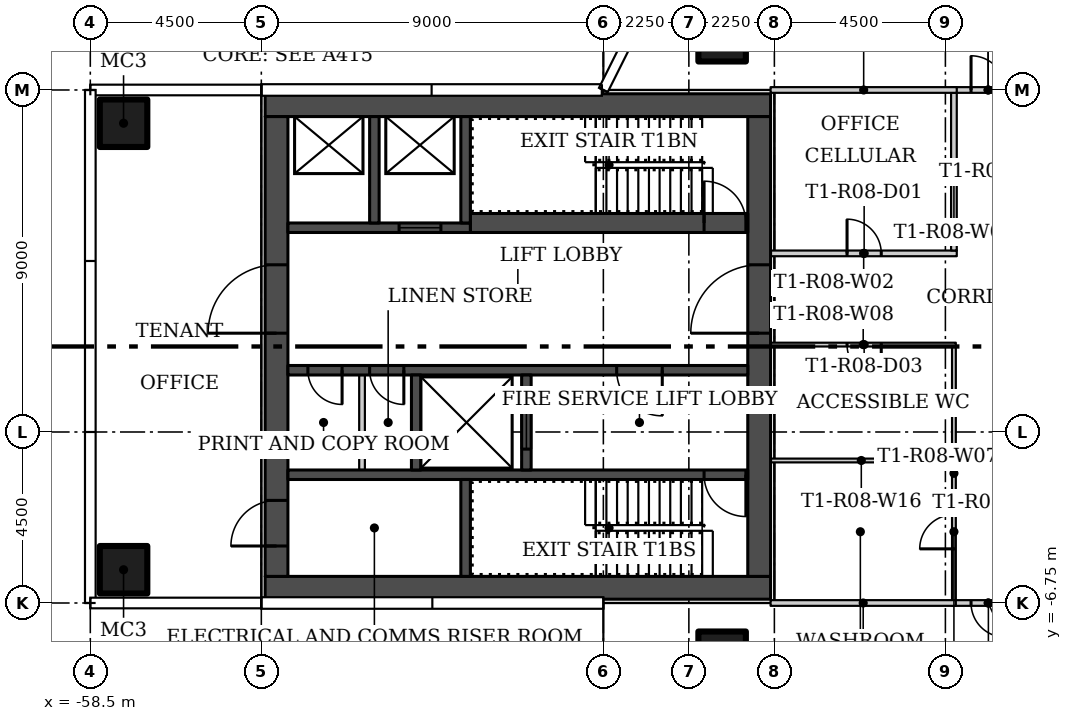
"""IFC4 building model, lengths in metres.
Left out: names, types, materials, properties, quantities, classifications, styles, units other than length and angle.
Written with IfcOpenShell. Run it as: python <this file> out.ifc"""

import sys

from ifc_helpers import new_model, si_unit, direction, frame, frame_2d, origin, origin_2d, place, context, subcontext, project, spatial, rectangle, hollow_rectangle, extrude, element, fill, save


model = new_model("IFC4")
c1 = context("Model", 3, precision=1e-05, world=origin(), true_north=direction((0.0, 1.0)))
c2 = subcontext(c1, "Body", "Model", "MODEL_VIEW")
j1 = project(units=[si_unit("LENGTHUNIT", "METRE"), si_unit("PLANEANGLEUNIT", "RADIAN")], contexts=[c1])
p1 = place(None, origin())
s1 = spatial("IfcSite", under=j1, at=p1, CompositionType="ELEMENT")
p2 = place(p1, origin())
s2 = spatial("IfcBuilding", under=s1, at=p2, CompositionType="ELEMENT")
p3 = place(p2, frame((0.0, 0.0, 85.8)))
s3 = spatial("IfcBuildingStorey", under=s2, at=p3, CompositionType="ELEMENT", Elevation=85.8)
for number, where in (
    (1, (-41.875, 8.125, 0.0)),
    (2, (-41.875, -8.125, 0.0)),
    (3, (-57.625, -5.875, 0.0)),
    (4, (-57.625, 5.875, 0.0)),
):
    element("IfcColumn", number, at=place(p3, frame(where)), inside=s3, PredefinedType="COLUMN", context=c2, shape_type="SweptSolid", body=[
        extrude(hollow_rectangle(XDim=1.25, YDim=1.25, WallThickness=0.05, at=origin_2d()), origin(), (0.0, 0.0, 1.0), 3.55),
    ])
p4 = place(p3, frame((-40.6, 2.45, 0.0)))
e5 = element("IfcWall", 5, at=p4, inside=s3, PredefinedType="PARTITIONING", context=c2, shape_type="SweptSolid", body=[
    extrude(rectangle(XDim=4.9, YDim=0.15, at=frame_2d((2.45, 0.0))), origin(), (0.0, 0.0, 1.0), 3.55),
])
p5 = place(p4, frame((2.012, 0.0, 0.0)))
e6 = element("IfcOpeningElement", 6, at=p5, cuts=e5, PredefinedType="OPENING", context=c2, shape_type="SweptSolid", body=[
    extrude(rectangle(XDim=0.9, YDim=2.1, at=frame_2d((0.45, 1.05))), frame((0.0, 0.085, 0.0), z_axis=(0.0, -1.0, 0.0), x_axis=(1.0, 0.0, 0.0)), (0.0, 0.0, 1.0), 0.17),
])
p6 = place(p3, frame((-35.775, 2.525, 0.0), z_axis=(0.0, 0.0, 1.0), x_axis=(0.0, 1.0, 0.0)))
e7 = element("IfcWall", 7, at=p6, inside=s3, PredefinedType="PARTITIONING", context=c2, shape_type="SweptSolid", body=[
    extrude(rectangle(XDim=4.15, YDim=0.15, at=frame_2d((2.075, 0.0))), origin(), (0.0, 0.0, 1.0), 3.55),
])
p7 = place(p3, frame((-35.775, -6.675, 0.0), z_axis=(0.0, 0.0, 1.0), x_axis=(0.0, 1.0, 0.0)))
e8 = element("IfcWall", 8, at=p7, inside=s3, PredefinedType="PARTITIONING", context=c2, shape_type="SweptSolid", body=[
    extrude(rectangle(XDim=6.675, YDim=0.1, at=frame_2d((3.337, 0.0))), origin(), (0.0, 0.0, 1.0), 3.55),
])
p8 = place(p7, frame((1.35, 0.0, 0.0)))
e9 = element("IfcOpeningElement", 9, at=p8, cuts=e8, PredefinedType="OPENING", context=c2, shape_type="SweptSolid", body=[
    extrude(rectangle(XDim=0.9, YDim=2.1, at=frame_2d((0.45, 1.05))), frame((0.0, 0.06, 0.0), z_axis=(0.0, -1.0, 0.0), x_axis=(1.0, 0.0, 0.0)), (0.0, 0.0, 1.0), 0.12),
])
p9 = place(p3, frame((-35.725, 0.05, 0.0), z_axis=(0.0, 0.0, 1.0), x_axis=(-1.0, 0.0, 0.0)))
e10 = element("IfcWall", 10, at=p9, inside=s3, PredefinedType="PARTITIONING", context=c2, shape_type="SweptSolid", body=[
    extrude(rectangle(XDim=4.875, YDim=0.1, at=frame_2d((2.438, 0.0))), origin(), (0.0, 0.0, 1.0), 3.55),
])
p10 = place(p9, frame((1.962, 0.0, 0.0)))
e11 = element("IfcOpeningElement", 11, at=p10, cuts=e10, PredefinedType="OPENING", context=c2, shape_type="SweptSolid", body=[
    extrude(rectangle(XDim=0.9, YDim=2.1, at=frame_2d((0.45, 1.05))), frame((0.0, 0.06, 0.0), z_axis=(0.0, -1.0, 0.0), x_axis=(1.0, 0.0, 0.0)), (0.0, 0.0, 1.0), 0.12),
])
p11 = place(p3, frame((-35.85, 6.75, 0.0)))
e12 = element("IfcWall", 12, at=p11, inside=s3, PredefinedType="PARTITIONING", context=c2, shape_type="SweptSolid", body=[
    extrude(rectangle(XDim=1.951, YDim=0.15, at=frame_2d((0.975, 0.0))), origin(), (0.0, 0.0, 1.0), 3.55),
])
p12 = place(p11, frame((0.525, 0.0, 0.0)))
e13 = element("IfcOpeningElement", 13, at=p12, cuts=e12, PredefinedType="OPENING", context=c2, shape_type="SweptSolid", body=[
    extrude(rectangle(XDim=0.9, YDim=2.1, at=frame_2d((0.45, 1.05))), frame((0.0, 0.085, 0.0), z_axis=(0.0, -1.0, 0.0), x_axis=(1.0, 0.0, 0.0)), (0.0, 0.0, 1.0), 0.17),
])
p13 = place(p3, frame((-33.912, -6.75, 0.0), z_axis=(0.0, 0.0, 1.0), x_axis=(-1.0, 0.0, 0.0)))
e14 = element("IfcWall", 14, at=p13, inside=s3, PredefinedType="PARTITIONING", context=c2, shape_type="SweptSolid", body=[
    extrude(rectangle(XDim=1.913, YDim=0.15, at=frame_2d((0.957, 0.0))), origin(), (0.0, 0.0, 1.0), 3.55),
])
p14 = place(p13, frame((0.513, 0.0, 0.0)))
e15 = element("IfcOpeningElement", 15, at=p14, cuts=e14, PredefinedType="OPENING", context=c2, shape_type="SweptSolid", body=[
    extrude(rectangle(XDim=0.9, YDim=2.1, at=frame_2d((0.45, 1.05))), frame((0.0, 0.085, 0.0), z_axis=(0.0, -1.0, 0.0), x_axis=(1.0, 0.0, 0.0)), (0.0, 0.0, 1.0), 0.17),
])
p15 = place(p3, frame((-35.7, 6.75, 0.0), z_axis=(0.0, 0.0, 1.0), x_axis=(-1.0, 0.0, 0.0)))
e16 = element("IfcWall", 16, at=p15, inside=s3, PredefinedType="PARTITIONING", context=c2, shape_type="SweptSolid", body=[
    extrude(rectangle(XDim=4.9, YDim=0.15, at=frame_2d((2.45, 0.0))), origin(), (0.0, 0.0, 1.0), 3.55),
])
p16 = place(p3, frame((-40.6, -6.75, 0.0)))
e17 = element("IfcWall", 17, at=p16, inside=s3, PredefinedType="PARTITIONING", context=c2, shape_type="SweptSolid", body=[
    extrude(rectangle(XDim=4.875, YDim=0.15, at=frame_2d((2.438, 0.0))), origin(), (0.0, 0.0, 1.0), 3.55),
])
p17 = place(p3, frame((-35.825, -3.0, 0.0), z_axis=(0.0, 0.0, 1.0), x_axis=(-1.0, 0.0, 0.0)))
e18 = element("IfcWall", 18, at=p17, inside=s3, PredefinedType="PARTITIONING", context=c2, shape_type="SweptSolid", body=[
    extrude(rectangle(XDim=4.775, YDim=0.1, at=frame_2d((2.387, 0.0))), origin(), (0.0, 0.0, 1.0), 3.55),
])
for number, where, z_axis, x_axis in (
    (19, (-40.6, -6.35, 0.0), (0.0, 0.0, 1.0), (-1.0, 0.0, 0.0)),
    (20, (-40.6, 6.35, 0.0), (0.0, 0.0, 1.0), (-1.0, 0.0, 0.0)),
):
    element("IfcWall", number, at=place(p3, frame(where, z_axis=z_axis, x_axis=x_axis)), inside=s3, PredefinedType="SHEAR", context=c2, shape_type="SweptSolid", body=[
        extrude(rectangle(XDim=13.3, YDim=0.6, at=frame_2d((6.65, 0.0))), origin(), (0.0, 0.0, 1.0), 3.55),
    ])
p18 = place(p3, frame((-40.9, -6.05, 0.0), z_axis=(0.0, 0.0, 1.0), x_axis=(0.0, 1.0, 0.0)))
e21 = element("IfcWall", 21, at=p18, inside=s3, PredefinedType="SHEAR", context=c2, shape_type="SweptSolid", body=[
    extrude(rectangle(XDim=12.1, YDim=0.6, at=frame_2d((6.05, 0.0))), origin(), (0.0, 0.0, 1.0), 3.55),
])
p19 = place(p18, frame((6.4, 0.0, 0.0)))
e22 = element("IfcOpeningElement", 22, at=p19, cuts=e21, PredefinedType="OPENING", context=c2, shape_type="SweptSolid", body=[
    extrude(rectangle(XDim=1.8, YDim=2.4, at=frame_2d((0.9, 1.2))), frame((0.0, 0.31, 0.0), z_axis=(0.0, -1.0, 0.0), x_axis=(1.0, 0.0, 0.0)), (0.0, 0.0, 1.0), 0.62),
])
p20 = place(p3, frame((-53.6, -6.05, 0.0), z_axis=(0.0, 0.0, 1.0), x_axis=(0.0, 1.0, 0.0)))
e23 = element("IfcWall", 23, at=p20, inside=s3, PredefinedType="SHEAR", context=c2, shape_type="SweptSolid", body=[
    extrude(rectangle(XDim=12.1, YDim=0.6, at=frame_2d((6.05, 0.0))), origin(), (0.0, 0.0, 1.0), 3.55),
])
p21 = place(p20, frame((0.8, 0.0, 0.0)))
e24 = element("IfcOpeningElement", 24, at=p21, cuts=e23, PredefinedType="OPENING", context=c2, shape_type="SweptSolid", body=[
    extrude(rectangle(XDim=1.2, YDim=2.1, at=frame_2d((0.6, 1.05))), frame((0.0, 0.31, 0.0), z_axis=(0.0, -1.0, 0.0), x_axis=(1.0, 0.0, 0.0)), (0.0, 0.0, 1.0), 0.62),
])
p22 = place(p20, frame((6.4, 0.0, 0.0)))
e25 = element("IfcOpeningElement", 25, at=p22, cuts=e23, PredefinedType="OPENING", context=c2, shape_type="SweptSolid", body=[
    extrude(rectangle(XDim=1.8, YDim=2.4, at=frame_2d((0.9, 1.2))), frame((0.0, 0.31, 0.0), z_axis=(0.0, -1.0, 0.0), x_axis=(1.0, 0.0, 0.0)), (0.0, 0.0, 1.0), 0.62),
])
p23 = place(p3, frame((-41.2, -3.375, 0.0), z_axis=(0.0, 0.0, 1.0), x_axis=(-1.0, 0.0, 0.0)))
e26 = element("IfcWall", 26, at=p23, inside=s3, PredefinedType="SHEAR", context=c2, shape_type="SweptSolid", body=[
    extrude(rectangle(XDim=12.1, YDim=0.25, at=frame_2d((6.05, 0.0))), origin(), (0.0, 0.0, 1.0), 3.55),
])
p24 = place(p23, frame((0.05, 0.0, 0.0)))
e27 = element("IfcOpeningElement", 27, at=p24, cuts=e26, PredefinedType="OPENING", context=c2, shape_type="SweptSolid", body=[
    extrude(rectangle(XDim=1.1, YDim=2.1, at=frame_2d((0.55, 1.05))), frame((0.0, 0.135, 0.0), z_axis=(0.0, -1.0, 0.0), x_axis=(1.0, 0.0, 0.0)), (0.0, 0.0, 1.0), 0.27),
])
p25 = place(p3, frame((-48.625, -6.05, 0.0), z_axis=(0.0, 0.0, 1.0), x_axis=(0.0, 1.0, 0.0)))
e28 = element("IfcWall", 28, at=p25, inside=s3, PredefinedType="SHEAR", context=c2, shape_type="SweptSolid", body=[
    extrude(rectangle(XDim=2.55, YDim=0.25, at=frame_2d((1.275, 0.0))), origin(), (0.0, 0.0, 1.0), 3.55),
])
p26 = place(p3, frame((-41.2, -0.625, 0.0), z_axis=(0.0, 0.0, 1.0), x_axis=(-1.0, 0.0, 0.0)))
e29 = element("IfcWall", 29, at=p26, inside=s3, PredefinedType="SHEAR", context=c2, shape_type="SweptSolid", body=[
    extrude(rectangle(XDim=12.1, YDim=0.25, at=frame_2d((6.05, 0.0))), origin(), (0.0, 0.0, 1.0), 3.55),
])
p27 = place(p26, frame((2.25, 0.0, 0.0)))
e30 = element("IfcOpeningElement", 30, at=p27, cuts=e29, PredefinedType="OPENING", context=c2, shape_type="SweptSolid", body=[
    extrude(rectangle(XDim=1.2, YDim=2.1, at=frame_2d((0.6, 1.05))), frame((0.0, 0.135, 0.0), z_axis=(0.0, -1.0, 0.0), x_axis=(1.0, 0.0, 0.0)), (0.0, 0.0, 1.0), 0.27),
])
p28 = place(p26, frame((9.05, 0.0, 0.0)))
e31 = element("IfcOpeningElement", 31, at=p28, cuts=e29, PredefinedType="OPENING", context=c2, shape_type="SweptSolid", body=[
    extrude(rectangle(XDim=0.9, YDim=2.1, at=frame_2d((0.45, 1.05))), frame((0.0, 0.135, 0.0), z_axis=(0.0, -1.0, 0.0), x_axis=(1.0, 0.0, 0.0)), (0.0, 0.0, 1.0), 0.27),
])
p29 = place(p26, frame((10.675, 0.0, 0.0)))
e32 = element("IfcOpeningElement", 32, at=p29, cuts=e29, PredefinedType="OPENING", context=c2, shape_type="SweptSolid", body=[
    extrude(rectangle(XDim=0.9, YDim=2.1, at=frame_2d((0.45, 1.05))), frame((0.0, 0.135, 0.0), z_axis=(0.0, -1.0, 0.0), x_axis=(1.0, 0.0, 0.0)), (0.0, 0.0, 1.0), 0.27),
])
p30 = place(p3, frame((-47.025, -3.25, 0.0), z_axis=(0.0, 0.0, 1.0), x_axis=(0.0, 1.0, 0.0)))
e33 = element("IfcWall", 33, at=p30, inside=s3, PredefinedType="SHEAR", context=c2, shape_type="SweptSolid", body=[
    extrude(rectangle(XDim=2.5, YDim=0.25, at=frame_2d((1.25, 0.0))), origin(), (0.0, 0.0, 1.0), 3.55),
])
p31 = place(p30, frame((0.55, 0.0, 0.0)))
e34 = element("IfcOpeningElement", 34, at=p31, cuts=e33, PredefinedType="OPENING", context=c2, shape_type="SweptSolid", body=[
    extrude(rectangle(XDim=1.4, YDim=2.4, at=frame_2d((0.7, 1.2))), frame((0.0, 0.135, 0.0), z_axis=(0.0, -1.0, 0.0), x_axis=(1.0, 0.0, 0.0)), (0.0, 0.0, 1.0), 0.27),
])
p32 = place(p3, frame((-49.925, -3.25, 0.0), z_axis=(0.0, 0.0, 1.0), x_axis=(0.0, 1.0, 0.0)))
e35 = element("IfcWall", 35, at=p32, inside=s3, PredefinedType="SHEAR", context=c2, shape_type="SweptSolid", body=[
    extrude(rectangle(XDim=2.5, YDim=0.25, at=frame_2d((1.25, 0.0))), origin(), (0.0, 0.0, 1.0), 3.55),
])
p33 = place(p3, frame((-51.35, -3.25, 0.0), z_axis=(0.0, 0.0, 1.0), x_axis=(0.0, 1.0, 0.0)))
e36 = element("IfcWall", 36, at=p33, inside=s3, PredefinedType="PARTITIONING", context=c2, shape_type="SweptSolid", body=[
    extrude(rectangle(XDim=2.5, YDim=0.15, at=frame_2d((1.25, 0.0))), origin(), (0.0, 0.0, 1.0), 3.55),
])
p34 = place(p3, frame((-48.5, 3.25, 0.0)))
e37 = element("IfcWall", 37, at=p34, inside=s3, PredefinedType="SHEAR", context=c2, shape_type="SweptSolid", body=[
    extrude(rectangle(XDim=7.3, YDim=0.5, at=frame_2d((3.65, 0.0))), origin(), (0.0, 0.0, 1.0), 3.55),
])
p35 = place(p34, frame((6.15, 0.0, 0.0)))
e38 = element("IfcOpeningElement", 38, at=p35, cuts=e37, PredefinedType="OPENING", context=c2, shape_type="SweptSolid", body=[
    extrude(rectangle(XDim=1.1, YDim=2.1, at=frame_2d((0.55, 1.05))), frame((0.0, 0.26, 0.0), z_axis=(0.0, -1.0, 0.0), x_axis=(1.0, 0.0, 0.0)), (0.0, 0.0, 1.0), 0.52),
])
p36 = place(p3, frame((-48.5, 3.125, 0.0), z_axis=(0.0, 0.0, 1.0), x_axis=(-1.0, 0.0, 0.0)))
e39 = element("IfcWall", 39, at=p36, inside=s3, PredefinedType="SHEAR", context=c2, shape_type="SweptSolid", body=[
    extrude(rectangle(XDim=4.8, YDim=0.25, at=frame_2d((2.4, 0.0))), origin(), (0.0, 0.0, 1.0), 3.55),
])
p37 = place(p36, frame((0.775, 0.0, 0.0)))
e40 = element("IfcOpeningElement", 40, at=p37, cuts=e39, PredefinedType="OPENING", context=c2, shape_type="SweptSolid", body=[
    extrude(rectangle(XDim=1.1, YDim=2.1, at=frame_2d((0.55, 1.05))), frame((0.0, 0.135, 0.0), z_axis=(0.0, -1.0, 0.0), x_axis=(1.0, 0.0, 0.0)), (0.0, 0.0, 1.0), 0.27),
])
for number, where, z_axis, x_axis in (
    (41, (-48.625, 3.25, 0.0), (0.0, 0.0, 1.0), (0.0, 1.0, 0.0)),
    (42, (-51.025, 3.25, 0.0), (0.0, 0.0, 1.0), (0.0, 1.0, 0.0)),
):
    element("IfcWall", number, at=place(p3, frame(where, z_axis=z_axis, x_axis=x_axis)), inside=s3, PredefinedType="SHEAR", context=c2, shape_type="SweptSolid", body=[
        extrude(rectangle(XDim=2.8, YDim=0.25, at=frame_2d((1.4, 0.0))), origin(), (0.0, 0.0, 1.0), 3.55),
    ])
p38 = place(p5, origin())
e43 = element("IfcDoor", 43, at=p38, inside=s3, OperationType="SINGLE_SWING_LEFT", PredefinedType="DOOR", context=c2, shape_type="SweptSolid", body=[
    extrude(rectangle(XDim=0.9, YDim=2.1, at=frame_2d((0.45, 1.05))), frame((0.0, 0.025, 0.0), z_axis=(0.0, -1.0, 0.0), x_axis=(1.0, 0.0, 0.0)), (0.0, 0.0, 1.0), 0.05),
])
fill(e6, e43)
p39 = place(p8, origin())
e44 = element("IfcDoor", 44, at=p39, inside=s3, OperationType="SINGLE_SWING_RIGHT", PredefinedType="DOOR", context=c2, shape_type="SweptSolid", body=[
    extrude(rectangle(XDim=0.9, YDim=2.1, at=frame_2d((0.45, 1.05))), frame((0.0, 0.025, 0.0), z_axis=(0.0, -1.0, 0.0), x_axis=(1.0, 0.0, 0.0)), (0.0, 0.0, 1.0), 0.05),
])
fill(e9, e44)
p40 = place(p10, origin())
e45 = element("IfcDoor", 45, at=p40, inside=s3, OperationType="SINGLE_SWING_RIGHT", PredefinedType="DOOR", context=c2, shape_type="SweptSolid", body=[
    extrude(rectangle(XDim=0.9, YDim=2.1, at=frame_2d((0.45, 1.05))), frame((0.0, 0.025, 0.0), z_axis=(0.0, -1.0, 0.0), x_axis=(1.0, 0.0, 0.0)), (0.0, 0.0, 1.0), 0.05),
])
fill(e11, e45)
p41 = place(p12, origin())
e46 = element("IfcDoor", 46, at=p41, inside=s3, OperationType="SINGLE_SWING_LEFT", PredefinedType="DOOR", context=c2, shape_type="SweptSolid", body=[
    extrude(rectangle(XDim=0.9, YDim=2.1, at=frame_2d((0.45, 1.05))), frame((0.0, 0.025, 0.0), z_axis=(0.0, -1.0, 0.0), x_axis=(1.0, 0.0, 0.0)), (0.0, 0.0, 1.0), 0.05),
])
fill(e13, e46)
p42 = place(p14, origin())
e47 = element("IfcDoor", 47, at=p42, inside=s3, OperationType="SINGLE_SWING_RIGHT", PredefinedType="DOOR", context=c2, shape_type="SweptSolid", body=[
    extrude(rectangle(XDim=0.9, YDim=2.1, at=frame_2d((0.45, 1.05))), frame((0.0, 0.025, 0.0), z_axis=(0.0, -1.0, 0.0), x_axis=(1.0, 0.0, 0.0)), (0.0, 0.0, 1.0), 0.05),
])
fill(e15, e47)
p43 = place(p19, origin())
e48 = element("IfcDoor", 48, at=p43, inside=s3, OperationType="DOUBLE_DOOR_SINGLE_SWING", PredefinedType="DOOR", context=c2, shape_type="SweptSolid", body=[
    extrude(rectangle(XDim=1.8, YDim=2.4, at=frame_2d((0.9, 1.2))), frame((0.0, 0.025, 0.0), z_axis=(0.0, -1.0, 0.0), x_axis=(1.0, 0.0, 0.0)), (0.0, 0.0, 1.0), 0.05),
])
fill(e22, e48)
p44 = place(p21, origin())
e49 = element("IfcDoor", 49, at=p44, inside=s3, OperationType="SINGLE_SWING_LEFT", PredefinedType="DOOR", context=c2, shape_type="SweptSolid", body=[
    extrude(rectangle(XDim=1.2, YDim=2.1, at=frame_2d((0.6, 1.05))), frame((0.0, 0.025, 0.0), z_axis=(0.0, -1.0, 0.0), x_axis=(1.0, 0.0, 0.0)), (0.0, 0.0, 1.0), 0.05),
])
fill(e24, e49)
p45 = place(p22, origin())
e50 = element("IfcDoor", 50, at=p45, inside=s3, OperationType="DOUBLE_DOOR_SINGLE_SWING", PredefinedType="DOOR", context=c2, shape_type="SweptSolid", body=[
    extrude(rectangle(XDim=1.8, YDim=2.4, at=frame_2d((0.9, 1.2))), frame((0.0, 0.025, 0.0), z_axis=(0.0, -1.0, 0.0), x_axis=(1.0, 0.0, 0.0)), (0.0, 0.0, 1.0), 0.05),
])
fill(e25, e50)
p46 = place(p24, origin())
e51 = element("IfcDoor", 51, at=p46, inside=s3, OperationType="SINGLE_SWING_LEFT", PredefinedType="DOOR", context=c2, shape_type="SweptSolid", body=[
    extrude(rectangle(XDim=1.1, YDim=2.1, at=frame_2d((0.55, 1.05))), frame((0.0, 0.025, 0.0), z_axis=(0.0, -1.0, 0.0), x_axis=(1.0, 0.0, 0.0)), (0.0, 0.0, 1.0), 0.05),
])
fill(e27, e51)
p47 = place(p27, origin())
e52 = element("IfcDoor", 52, at=p47, inside=s3, OperationType="SINGLE_SWING_LEFT", PredefinedType="DOOR", context=c2, shape_type="SweptSolid", body=[
    extrude(rectangle(XDim=1.2, YDim=2.1, at=frame_2d((0.6, 1.05))), frame((0.0, 0.025, 0.0), z_axis=(0.0, -1.0, 0.0), x_axis=(1.0, 0.0, 0.0)), (0.0, 0.0, 1.0), 0.05),
])
fill(e30, e52)
p48 = place(p28, origin())
e53 = element("IfcDoor", 53, at=p48, inside=s3, OperationType="SINGLE_SWING_RIGHT", PredefinedType="DOOR", context=c2, shape_type="SweptSolid", body=[
    extrude(rectangle(XDim=0.9, YDim=2.1, at=frame_2d((0.45, 1.05))), frame((0.0, 0.025, 0.0), z_axis=(0.0, -1.0, 0.0), x_axis=(1.0, 0.0, 0.0)), (0.0, 0.0, 1.0), 0.05),
])
fill(e31, e53)
p49 = place(p29, origin())
e54 = element("IfcDoor", 54, at=p49, inside=s3, OperationType="SINGLE_SWING_RIGHT", PredefinedType="DOOR", context=c2, shape_type="SweptSolid", body=[
    extrude(rectangle(XDim=0.9, YDim=2.1, at=frame_2d((0.45, 1.05))), frame((0.0, 0.025, 0.0), z_axis=(0.0, -1.0, 0.0), x_axis=(1.0, 0.0, 0.0)), (0.0, 0.0, 1.0), 0.05),
])
fill(e32, e54)
p50 = place(p31, origin())
e55 = element("IfcDoor", 55, at=p50, inside=s3, OperationType="SLIDING_TO_LEFT", PredefinedType="DOOR", context=c2, shape_type="SweptSolid", body=[
    extrude(rectangle(XDim=1.4, YDim=2.4, at=frame_2d((0.7, 1.2))), frame((0.0, 0.025, 0.0), z_axis=(0.0, -1.0, 0.0), x_axis=(1.0, 0.0, 0.0)), (0.0, 0.0, 1.0), 0.05),
])
fill(e34, e55)
p51 = place(p35, origin())
e56 = element("IfcDoor", 56, at=p51, inside=s3, OperationType="SINGLE_SWING_RIGHT", PredefinedType="DOOR", context=c2, shape_type="SweptSolid", body=[
    extrude(rectangle(XDim=1.1, YDim=2.1, at=frame_2d((0.55, 1.05))), frame((0.0, 0.025, 0.0), z_axis=(0.0, -1.0, 0.0), x_axis=(1.0, 0.0, 0.0)), (0.0, 0.0, 1.0), 0.05),
])
fill(e38, e56)
p52 = place(p37, origin())
e57 = element("IfcDoor", 57, at=p52, inside=s3, OperationType="SLIDING_TO_LEFT", PredefinedType="DOOR", context=c2, shape_type="SweptSolid", body=[
    extrude(rectangle(XDim=1.1, YDim=2.1, at=frame_2d((0.55, 1.05))), frame((0.0, 0.025, 0.0), z_axis=(0.0, -1.0, 0.0), x_axis=(1.0, 0.0, 0.0)), (0.0, 0.0, 1.0), 0.05),
])
fill(e40, e57)
save(model, sys.argv[1])
